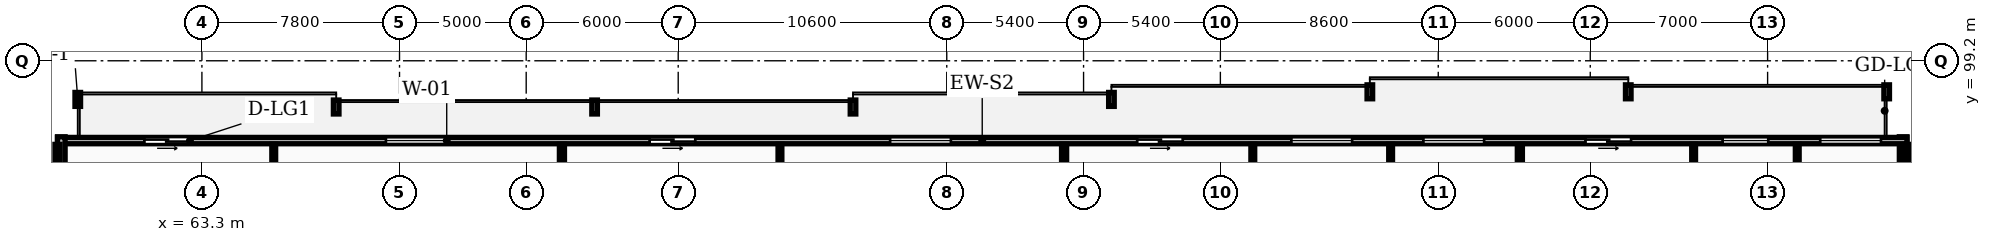
"""IFC4 building model, lengths in metres.
Left out: names, types, materials, properties, quantities, classifications, styles, units other than length and angle.
Written with IfcOpenShell. Run it as: python <this file> out.ifc"""

import sys

from ifc_helpers import new_model, si_unit, direction, frame, frame_2d, origin, place, context, subcontext, project, spatial, rectangle, extrude, element, fill, save


model = new_model("IFC4")
c1 = context("Model", 3, precision=1e-05, world=origin(), true_north=direction((0.0, 1.0)))
c2 = subcontext(c1, "Body", "Model", "MODEL_VIEW")
j1 = project(units=[si_unit("LENGTHUNIT", "METRE"), si_unit("PLANEANGLEUNIT", "RADIAN")], contexts=[c1])
p1 = place(None, origin())
s1 = spatial("IfcSite", under=j1, at=p1, CompositionType="ELEMENT")
p2 = place(p1, origin())
s2 = spatial("IfcBuilding", under=s1, at=p2, CompositionType="ELEMENT")
p3 = place(p2, frame((0.0, 0.0, 119.8)))
s3 = spatial("IfcBuildingStorey", under=s2, at=p3, CompositionType="ELEMENT", Elevation=119.8)
p4 = place(p3, frame((130.45, 92.6, 0.0), z_axis=(0.0, 0.0, 1.0), x_axis=(0.0, 1.0, 0.0)))
e1 = element("IfcWall", 1, at=p4, inside=s3, PredefinedType="STANDARD", context=c2, shape_type="SweptSolid", body=[
    extrude(rectangle(XDim=3.6, YDim=0.3, at=frame_2d((1.8, 0.0))), origin(), (0.0, 0.0, 1.0), 2.97),
])
p5 = place(p3, frame((130.6, 96.05, 0.0), z_axis=(0.0, 0.0, 1.0), x_axis=(-1.0, 0.0, 0.0)))
e2 = element("IfcWall", 2, at=p5, inside=s3, PredefinedType="STANDARD", context=c2, shape_type="SweptSolid", body=[
    extrude(rectangle(XDim=73.0, YDim=0.25, at=frame_2d((36.5, 0.0))), origin(), (0.0, 0.0, 1.0), 2.97),
])
p6 = place(p5, frame((67.772, 0.0, 0.0)))
e3 = element("IfcOpeningElement", 3, at=p6, cuts=e2, PredefinedType="OPENING", context=c2, shape_type="SweptSolid", body=[
    extrude(rectangle(XDim=1.8, YDim=2.2, at=frame_2d((0.9, 1.1))), frame((0.0, 0.135, 0.0), z_axis=(0.0, -1.0, 0.0), x_axis=(1.0, 0.0, 0.0)), (0.0, 0.0, 1.0), 0.27),
])
p7 = place(p5, frame((57.637, 0.0, 0.85)))
e4 = element("IfcOpeningElement", 4, at=p7, cuts=e2, PredefinedType="OPENING", context=c2, shape_type="SweptSolid", body=[
    extrude(rectangle(XDim=2.4, YDim=1.9, at=frame_2d((1.2, 0.95))), frame((0.0, 0.135, 0.0), z_axis=(0.0, -1.0, 0.0), x_axis=(1.0, 0.0, 0.0)), (0.0, 0.0, 1.0), 0.27),
])
p8 = place(p5, frame((47.827, 0.0, 0.0)))
e5 = element("IfcOpeningElement", 5, at=p8, cuts=e2, PredefinedType="OPENING", context=c2, shape_type="SweptSolid", body=[
    extrude(rectangle(XDim=1.8, YDim=2.2, at=frame_2d((0.9, 1.1))), frame((0.0, 0.135, 0.0), z_axis=(0.0, -1.0, 0.0), x_axis=(1.0, 0.0, 0.0)), (0.0, 0.0, 1.0), 0.27),
])
p9 = place(p5, frame((37.736, 0.0, 0.85)))
e6 = element("IfcOpeningElement", 6, at=p9, cuts=e2, PredefinedType="OPENING", context=c2, shape_type="SweptSolid", body=[
    extrude(rectangle(XDim=2.4, YDim=1.9, at=frame_2d((1.2, 0.95))), frame((0.0, 0.135, 0.0), z_axis=(0.0, -1.0, 0.0), x_axis=(1.0, 0.0, 0.0)), (0.0, 0.0, 1.0), 0.27),
])
p10 = place(p5, frame((21.9, 0.0, 0.85)))
e7 = element("IfcOpeningElement", 7, at=p10, cuts=e2, PredefinedType="OPENING", context=c2, shape_type="SweptSolid", body=[
    extrude(rectangle(XDim=2.4, YDim=1.9, at=frame_2d((1.2, 0.95))), frame((0.0, 0.135, 0.0), z_axis=(0.0, -1.0, 0.0), x_axis=(1.0, 0.0, 0.0)), (0.0, 0.0, 1.0), 0.27),
])
p11 = place(p5, frame((28.584, 0.0, 0.0)))
e8 = element("IfcOpeningElement", 8, at=p11, cuts=e2, PredefinedType="OPENING", context=c2, shape_type="SweptSolid", body=[
    extrude(rectangle(XDim=1.8, YDim=2.2, at=frame_2d((0.9, 1.1))), frame((0.0, 0.135, 0.0), z_axis=(0.0, -1.0, 0.0), x_axis=(1.0, 0.0, 0.0)), (0.0, 0.0, 1.0), 0.27),
])
p12 = place(p5, frame((16.689, 0.0, 0.85)))
e9 = element("IfcOpeningElement", 9, at=p12, cuts=e2, PredefinedType="OPENING", context=c2, shape_type="SweptSolid", body=[
    extrude(rectangle(XDim=2.4, YDim=1.9, at=frame_2d((1.2, 0.95))), frame((0.0, 0.135, 0.0), z_axis=(0.0, -1.0, 0.0), x_axis=(1.0, 0.0, 0.0)), (0.0, 0.0, 1.0), 0.27),
])
p13 = place(p5, frame((5.475, 0.0, 0.85)))
e10 = element("IfcOpeningElement", 10, at=p13, cuts=e2, PredefinedType="OPENING", context=c2, shape_type="SweptSolid", body=[
    extrude(rectangle(XDim=1.8, YDim=1.8, at=frame_2d((0.9, 0.9))), frame((0.0, 0.135, 0.0), z_axis=(0.0, -1.0, 0.0), x_axis=(1.0, 0.0, 0.0)), (0.0, 0.0, 1.0), 0.27),
])
p14 = place(p5, frame((10.889, 0.0, 0.0)))
e11 = element("IfcOpeningElement", 11, at=p14, cuts=e2, PredefinedType="OPENING", context=c2, shape_type="SweptSolid", body=[
    extrude(rectangle(XDim=1.8, YDim=2.2, at=frame_2d((0.9, 1.1))), frame((0.0, 0.135, 0.0), z_axis=(0.0, -1.0, 0.0), x_axis=(1.0, 0.0, 0.0)), (0.0, 0.0, 1.0), 0.27),
])
p15 = place(p5, frame((1.025, 0.0, 0.85)))
e12 = element("IfcOpeningElement", 12, at=p15, cuts=e2, PredefinedType="OPENING", context=c2, shape_type="SweptSolid", body=[
    extrude(rectangle(XDim=2.4, YDim=1.9, at=frame_2d((1.2, 0.95))), frame((0.0, 0.135, 0.0), z_axis=(0.0, -1.0, 0.0), x_axis=(1.0, 0.0, 0.0)), (0.0, 0.0, 1.0), 0.27),
])
p16 = place(p3, frame((57.75, 96.2, 0.0), z_axis=(0.0, 0.0, 1.0), x_axis=(0.0, -1.0, 0.0)))
e13 = element("IfcWall", 13, at=p16, inside=s3, PredefinedType="STANDARD", context=c2, shape_type="SweptSolid", body=[
    extrude(rectangle(XDim=3.6, YDim=0.3, at=frame_2d((1.8, 0.0))), origin(), (0.0, 0.0, 1.0), 2.97),
])
for number, where, z_axis, x_axis in (
    (14, (57.6, 69.83, 0.0), (0.0, 0.0, 1.0), (0.0, 1.0, 0.0)),
    (15, (130.6, 69.83, 0.0), (0.0, 0.0, 1.0), (0.0, 1.0, 0.0)),
    (16, (77.51, 69.83, 0.0), (0.0, 0.0, 1.0), (0.0, 1.0, 0.0)),
):
    element("IfcWall", number, at=place(p3, frame(where, z_axis=z_axis, x_axis=x_axis)), inside=s3, PredefinedType="PARTITIONING", context=c2, shape_type="SweptSolid", body=[
        extrude(rectangle(XDim=26.07, YDim=0.2, at=frame_2d((13.035, 0.0))), origin(), (0.0, 0.0, 1.0), 2.97),
    ])
p17 = place(p3, frame((66.135, 91.08, 0.0), z_axis=(0.0, 0.0, 1.0), x_axis=(0.0, 1.0, 0.0)))
e17 = element("IfcWall", 17, at=p17, inside=s3, PredefinedType="PARTITIONING", context=c2, shape_type="SweptSolid", body=[
    extrude(rectangle(XDim=4.82, YDim=0.15, at=frame_2d((2.41, 0.0))), origin(), (0.0, 0.0, 1.0), 2.97),
])
p18 = place(p3, frame((97.332, 69.83, 0.0), z_axis=(0.0, 0.0, 1.0), x_axis=(0.0, 1.0, 0.0)))
e18 = element("IfcWall", 18, at=p18, inside=s3, PredefinedType="PARTITIONING", context=c2, shape_type="SweptSolid", body=[
    extrude(rectangle(XDim=26.07, YDim=0.2, at=frame_2d((13.035, 0.0))), origin(), (0.0, 0.0, 1.0), 2.97),
])
p19 = place(p3, frame((86.116, 91.08, 0.0), z_axis=(0.0, 0.0, 1.0), x_axis=(0.0, 1.0, 0.0)))
e19 = element("IfcWall", 19, at=p19, inside=s3, PredefinedType="PARTITIONING", context=c2, shape_type="SweptSolid", body=[
    extrude(rectangle(XDim=4.82, YDim=0.15, at=frame_2d((2.41, 0.0))), origin(), (0.0, 0.0, 1.0), 2.97),
])
p20 = place(p3, frame((115.321, 69.83, 0.0), z_axis=(0.0, 0.0, 1.0), x_axis=(0.0, 1.0, 0.0)))
e20 = element("IfcWall", 20, at=p20, inside=s3, PredefinedType="PARTITIONING", context=c2, shape_type="SweptSolid", body=[
    extrude(rectangle(XDim=26.07, YDim=0.2, at=frame_2d((13.035, 0.0))), origin(), (0.0, 0.0, 1.0), 2.97),
])
p21 = place(p3, frame((104.78, 85.94, 0.0), z_axis=(0.0, 0.0, 1.0), x_axis=(0.0, 1.0, 0.0)))
e21 = element("IfcWall", 21, at=p21, inside=s3, PredefinedType="PARTITIONING", context=c2, shape_type="SweptSolid", body=[
    extrude(rectangle(XDim=9.96, YDim=0.15, at=frame_2d((4.98, 0.0))), origin(), (0.0, 0.0, 1.0), 2.97),
])
p22 = place(p21, frame((2.99, 0.0, 0.0)))
e22 = element("IfcOpeningElement", 22, at=p22, cuts=e21, PredefinedType="OPENING", context=c2, shape_type="SweptSolid", body=[
    extrude(rectangle(XDim=0.92, YDim=2.08, at=frame_2d((0.46, 1.04))), frame((0.0, 0.085, 0.0), z_axis=(0.0, -1.0, 0.0), x_axis=(1.0, 0.0, 0.0)), (0.0, 0.0, 1.0), 0.17),
])
p23 = place(p3, frame((110.22, 88.67, 0.0), z_axis=(0.0, 0.0, 1.0), x_axis=(0.0, 1.0, 0.0)))
e23 = element("IfcWall", 23, at=p23, inside=s3, PredefinedType="PARTITIONING", context=c2, shape_type="SweptSolid", body=[
    extrude(rectangle(XDim=7.23, YDim=0.15, at=frame_2d((3.615, 0.0))), origin(), (0.0, 0.0, 1.0), 2.97),
])
p24 = place(p23, frame((0.26, 0.0, 0.0)))
e24 = element("IfcOpeningElement", 24, at=p24, cuts=e23, PredefinedType="OPENING", context=c2, shape_type="SweptSolid", body=[
    extrude(rectangle(XDim=0.92, YDim=2.08, at=frame_2d((0.46, 1.04))), frame((0.0, 0.085, 0.0), z_axis=(0.0, -1.0, 0.0), x_axis=(1.0, 0.0, 0.0)), (0.0, 0.0, 1.0), 0.17),
])
p25 = place(p3, frame((122.18, 85.94, 0.0), z_axis=(0.0, 0.0, 1.0), x_axis=(0.0, 1.0, 0.0)))
e25 = element("IfcWall", 25, at=p25, inside=s3, PredefinedType="PARTITIONING", context=c2, shape_type="SweptSolid", body=[
    extrude(rectangle(XDim=9.96, YDim=0.15, at=frame_2d((4.98, 0.0))), origin(), (0.0, 0.0, 1.0), 2.97),
])
p26 = place(p25, frame((2.88, 0.0, 0.0)))
e26 = element("IfcOpeningElement", 26, at=p26, cuts=e25, PredefinedType="OPENING", context=c2, shape_type="SweptSolid", body=[
    extrude(rectangle(XDim=0.92, YDim=2.08, at=frame_2d((0.46, 1.04))), frame((0.0, 0.085, 0.0), z_axis=(0.0, -1.0, 0.0), x_axis=(1.0, 0.0, 0.0)), (0.0, 0.0, 1.0), 0.17),
])
p27 = place(p3, frame((126.27, 88.56, 0.0), z_axis=(0.0, 0.0, 1.0), x_axis=(0.0, 1.0, 0.0)))
e27 = element("IfcWall", 27, at=p27, inside=s3, PredefinedType="PARTITIONING", context=c2, shape_type="SweptSolid", body=[
    extrude(rectangle(XDim=7.34, YDim=0.15, at=frame_2d((3.67, 0.0))), origin(), (0.0, 0.0, 1.0), 2.97),
])
p28 = place(p27, frame((0.26, 0.0, 0.0)))
e28 = element("IfcOpeningElement", 28, at=p28, cuts=e27, PredefinedType="OPENING", context=c2, shape_type="SweptSolid", body=[
    extrude(rectangle(XDim=0.92, YDim=2.08, at=frame_2d((0.46, 1.04))), frame((0.0, 0.085, 0.0), z_axis=(0.0, -1.0, 0.0), x_axis=(1.0, 0.0, 0.0)), (0.0, 0.0, 1.0), 0.17),
])
p29 = place(p6, origin())
e29 = element("IfcDoor", 29, at=p29, inside=s3, OperationType="SLIDING_TO_LEFT", PredefinedType="DOOR", context=c2, shape_type="SweptSolid", body=[
    extrude(rectangle(XDim=1.8, YDim=2.2, at=frame_2d((0.9, 1.1))), frame((0.0, 0.025, 0.0), z_axis=(0.0, -1.0, 0.0), x_axis=(1.0, 0.0, 0.0)), (0.0, 0.0, 1.0), 0.05),
])
fill(e3, e29)
p30 = place(p7, origin())
e30 = element("IfcWindow", 30, at=p30, inside=s3, PartitioningType="DOUBLE_PANEL_VERTICAL", PredefinedType="WINDOW", context=c2, shape_type="SweptSolid", body=[
    extrude(rectangle(XDim=2.4, YDim=1.9, at=frame_2d((1.2, 0.95))), frame((0.0, 0.03, 0.0), z_axis=(0.0, -1.0, 0.0), x_axis=(1.0, 0.0, 0.0)), (0.0, 0.0, 1.0), 0.06),
])
fill(e4, e30)
p31 = place(p8, origin())
e31 = element("IfcDoor", 31, at=p31, inside=s3, OperationType="SLIDING_TO_LEFT", PredefinedType="DOOR", context=c2, shape_type="SweptSolid", body=[
    extrude(rectangle(XDim=1.8, YDim=2.2, at=frame_2d((0.9, 1.1))), frame((0.0, 0.025, 0.0), z_axis=(0.0, -1.0, 0.0), x_axis=(1.0, 0.0, 0.0)), (0.0, 0.0, 1.0), 0.05),
])
fill(e5, e31)
p32 = place(p9, origin())
e32 = element("IfcWindow", 32, at=p32, inside=s3, PartitioningType="DOUBLE_PANEL_VERTICAL", PredefinedType="WINDOW", context=c2, shape_type="SweptSolid", body=[
    extrude(rectangle(XDim=2.4, YDim=1.9, at=frame_2d((1.2, 0.95))), frame((0.0, 0.03, 0.0), z_axis=(0.0, -1.0, 0.0), x_axis=(1.0, 0.0, 0.0)), (0.0, 0.0, 1.0), 0.06),
])
fill(e6, e32)
p33 = place(p10, origin())
e33 = element("IfcWindow", 33, at=p33, inside=s3, PartitioningType="DOUBLE_PANEL_VERTICAL", PredefinedType="WINDOW", context=c2, shape_type="SweptSolid", body=[
    extrude(rectangle(XDim=2.4, YDim=1.9, at=frame_2d((1.2, 0.95))), frame((0.0, 0.03, 0.0), z_axis=(0.0, -1.0, 0.0), x_axis=(1.0, 0.0, 0.0)), (0.0, 0.0, 1.0), 0.06),
])
fill(e7, e33)
p34 = place(p11, origin())
e34 = element("IfcDoor", 34, at=p34, inside=s3, OperationType="SLIDING_TO_LEFT", PredefinedType="DOOR", context=c2, shape_type="SweptSolid", body=[
    extrude(rectangle(XDim=1.8, YDim=2.2, at=frame_2d((0.9, 1.1))), frame((0.0, 0.025, 0.0), z_axis=(0.0, -1.0, 0.0), x_axis=(1.0, 0.0, 0.0)), (0.0, 0.0, 1.0), 0.05),
])
fill(e8, e34)
p35 = place(p12, origin())
e35 = element("IfcWindow", 35, at=p35, inside=s3, PartitioningType="DOUBLE_PANEL_VERTICAL", PredefinedType="WINDOW", context=c2, shape_type="SweptSolid", body=[
    extrude(rectangle(XDim=2.4, YDim=1.9, at=frame_2d((1.2, 0.95))), frame((0.0, 0.03, 0.0), z_axis=(0.0, -1.0, 0.0), x_axis=(1.0, 0.0, 0.0)), (0.0, 0.0, 1.0), 0.06),
])
fill(e9, e35)
p36 = place(p13, origin())
e36 = element("IfcWindow", 36, at=p36, inside=s3, PartitioningType="SINGLE_PANEL", PredefinedType="WINDOW", context=c2, shape_type="SweptSolid", body=[
    extrude(rectangle(XDim=1.8, YDim=1.8, at=frame_2d((0.9, 0.9))), frame((0.0, 0.03, 0.0), z_axis=(0.0, -1.0, 0.0), x_axis=(1.0, 0.0, 0.0)), (0.0, 0.0, 1.0), 0.06),
])
fill(e10, e36)
p37 = place(p14, origin())
e37 = element("IfcDoor", 37, at=p37, inside=s3, OperationType="SLIDING_TO_LEFT", PredefinedType="DOOR", context=c2, shape_type="SweptSolid", body=[
    extrude(rectangle(XDim=1.8, YDim=2.2, at=frame_2d((0.9, 1.1))), frame((0.0, 0.025, 0.0), z_axis=(0.0, -1.0, 0.0), x_axis=(1.0, 0.0, 0.0)), (0.0, 0.0, 1.0), 0.05),
])
fill(e11, e37)
p38 = place(p15, origin())
e38 = element("IfcWindow", 38, at=p38, inside=s3, PartitioningType="DOUBLE_PANEL_VERTICAL", PredefinedType="WINDOW", context=c2, shape_type="SweptSolid", body=[
    extrude(rectangle(XDim=2.4, YDim=1.9, at=frame_2d((1.2, 0.95))), frame((0.0, 0.03, 0.0), z_axis=(0.0, -1.0, 0.0), x_axis=(1.0, 0.0, 0.0)), (0.0, 0.0, 1.0), 0.06),
])
fill(e12, e38)
save(model, sys.argv[1])
